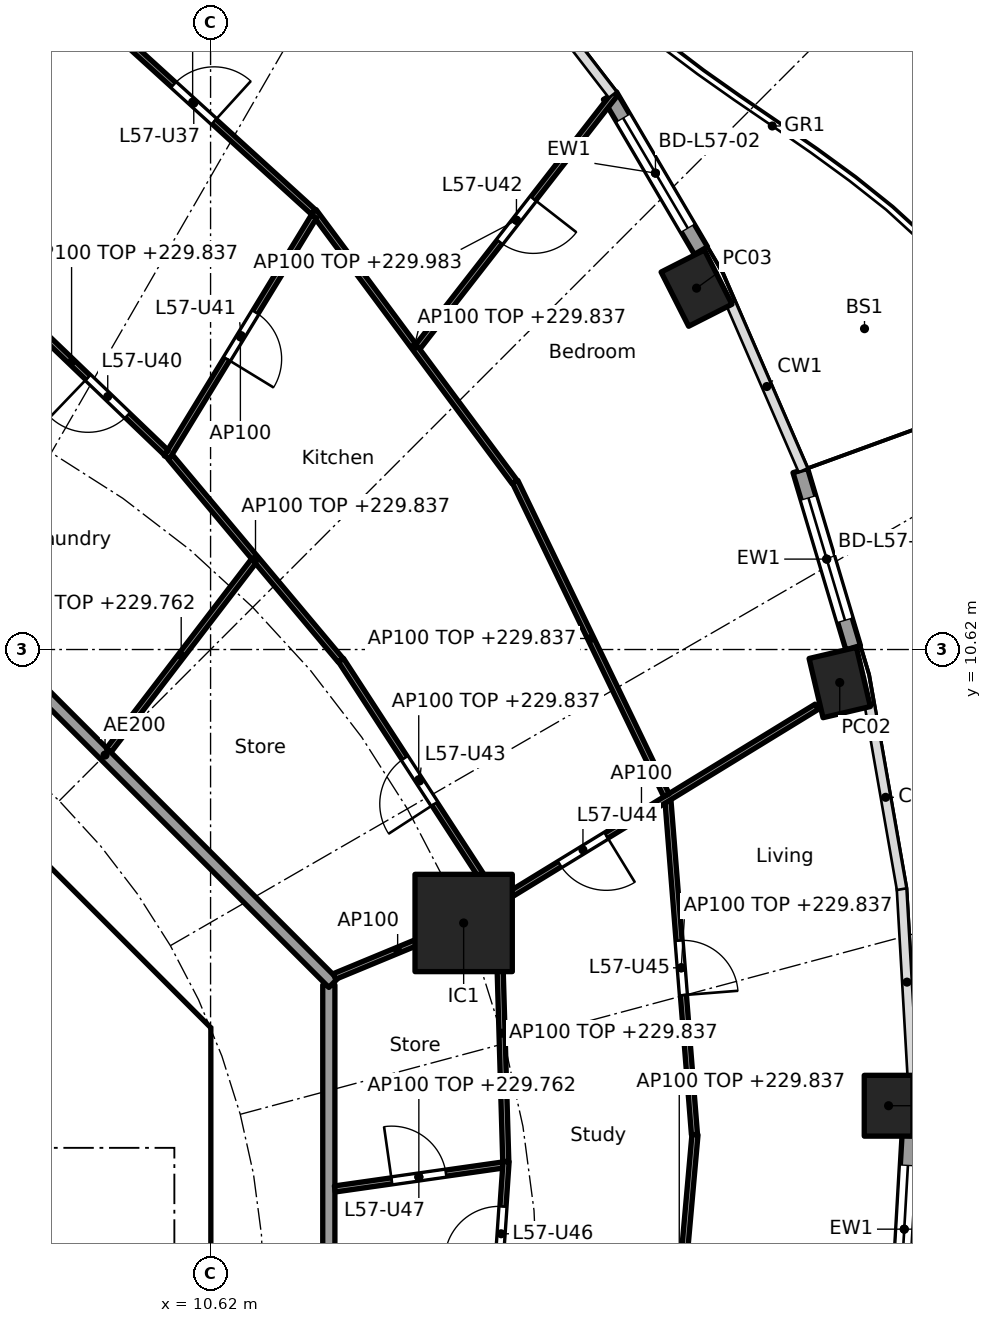
"""IFC4 building model, lengths in metres.
Left out: names, types, materials, properties, quantities, classifications, styles, units other than length and angle.
Written with IfcOpenShell. Run it as: python <this file> out.ifc"""

import sys

from ifc_helpers import new_model, si_unit, direction, frame, frame_2d, origin, origin_2d, place, context, subcontext, project, spatial, polyline, rectangle, hollow_rectangle, outline, extrude, element, fill, save


model = new_model("IFC4")
c1 = context("Model", 3, precision=1e-05, world=origin(), true_north=direction((0.0, 1.0)))
c2 = subcontext(c1, "Body", "Model", "MODEL_VIEW")
j1 = project(units=[si_unit("LENGTHUNIT", "METRE"), si_unit("PLANEANGLEUNIT", "RADIAN")], contexts=[c1])
p1 = place(None, origin())
s1 = spatial("IfcSite", under=j1, at=p1, CompositionType="ELEMENT")
p2 = place(p1, origin())
s2 = spatial("IfcBuilding", under=s1, at=p2, CompositionType="ELEMENT")
p3 = place(p2, frame((0.0, 0.0, 227.0)))
s3 = spatial("IfcBuildingStorey", under=s2, at=p3, CompositionType="ELEMENT", Elevation=227.0)
for number, where, z_axis, x_axis in (
    (1, (21.77, 3.118, 0.0), (0.0, 0.0, 1.0), (0.0, 1.0, 0.0)),
    (2, (20.967, 10.077, 0.0), (0.0, 0.0, 1.0), (-0.229, 0.973, 0.0)),
    (3, (18.612, 16.563, 0.0), (0.0, 0.0, 1.0), (-0.452, 0.892, 0.0)),
):
    element("IfcColumn", number, at=place(p3, frame(where, z_axis=z_axis, x_axis=x_axis)), inside=s3, PredefinedType="COLUMN", context=c2, shape_type="SweptSolid", body=[
        extrude(hollow_rectangle(XDim=1.0, YDim=0.8, WallThickness=0.032, at=origin_2d()), origin(), (0.0, 0.0, 1.0), 3.7),
    ])
p4 = place(p3, frame((14.782, 6.123, 0.0), z_axis=(0.0, 0.0, 1.0), x_axis=(1.0, 0.0, 0.0)))
e4 = element("IfcColumn", 4, at=p4, inside=s3, PredefinedType="COLUMN", context=c2, shape_type="SweptSolid", body=[
    extrude(rectangle(XDim=1.6, YDim=1.6, at=origin_2d()), origin(), (0.0, 0.0, 1.0), 3.7),
])
p5 = place(p3, frame((20.318, 13.564, 0.0), z_axis=(0.0, 0.0, 1.0), x_axis=(0.285785716255, -0.958293548128, 0.0)))
e5 = element("IfcWall", 5, at=p5, inside=s3, PredefinedType="SOLIDWALL", context=c2, shape_type="SweptSolid", body=[
    extrude(rectangle(XDim=3.04, YDim=0.25, at=frame_2d((1.52, 0.0))), origin(), (0.0, 0.0, 1.0), 3.44),
])
p6 = place(p5, frame((0.47, 0.0, 0.0)))
e6 = element("IfcOpeningElement", 6, at=p6, cuts=e5, PredefinedType="OPENING", context=c2, shape_type="SweptSolid", body=[
    extrude(rectangle(XDim=2.1, YDim=2.4, at=frame_2d((1.05, 1.2))), frame((0.0, 0.135, 0.0), z_axis=(0.0, -1.0, 0.0), x_axis=(1.0, 0.0, 0.0)), (0.0, 0.0, 1.0), 0.27),
])
p7 = place(p3, frame((17.188, 19.728, 0.0), z_axis=(0.0, 0.0, 1.0), x_axis=(0.506391620556, -0.862303616269, 0.0)))
e7 = element("IfcWall", 7, at=p7, inside=s3, PredefinedType="SOLIDWALL", context=c2, shape_type="SweptSolid", body=[
    extrude(rectangle(XDim=2.954, YDim=0.25, at=frame_2d((1.477, 0.0))), origin(), (0.0, 0.0, 1.0), 3.44),
])
p8 = place(p7, frame((0.427, 0.0, 0.0)))
e8 = element("IfcOpeningElement", 8, at=p8, cuts=e7, PredefinedType="OPENING", context=c2, shape_type="SweptSolid", body=[
    extrude(rectangle(XDim=2.1, YDim=2.4, at=frame_2d((1.05, 1.2))), frame((0.0, 0.135, 0.0), z_axis=(0.0, -1.0, 0.0), x_axis=(1.0, 0.0, 0.0)), (0.0, 0.0, 1.0), 0.27),
])
p9 = place(p3, frame((22.116, 2.626, 0.0), z_axis=(0.0, 0.0, 1.0), x_axis=(-0.057528189427, -0.998343882348, 0.0)))
e9 = element("IfcWall", 9, at=p9, inside=s3, PredefinedType="SOLIDWALL", context=c2, shape_type="SweptSolid", body=[
    extrude(rectangle(XDim=3.081, YDim=0.25, at=frame_2d((1.541, 0.0))), origin(), (0.0, 0.0, 1.0), 3.44),
])
p10 = place(p9, frame((0.49, 0.0, 0.0)))
e10 = element("IfcOpeningElement", 10, at=p10, cuts=e9, PredefinedType="OPENING", context=c2, shape_type="SweptSolid", body=[
    extrude(rectangle(XDim=2.1, YDim=2.4, at=frame_2d((1.05, 1.2))), frame((0.0, 0.135, 0.0), z_axis=(0.0, -1.0, 0.0), x_axis=(1.0, 0.0, 0.0)), (0.0, 0.0, 1.0), 0.27),
])
p11 = place(p3, frame((9.988, 4.613, 0.0), z_axis=(0.0, 0.0, 1.0), x_axis=(-0.707106781187, 0.707106781187, 0.0)))
e11 = element("IfcWall", 11, at=p11, inside=s3, PredefinedType="SHEAR", context=c2, shape_type="SweptSolid", body=[
    extrude(rectangle(XDim=7.602, YDim=0.6, at=frame_2d((3.801, 0.0))), origin(), (0.0, 0.0, 1.0), 3.44),
])
p12 = place(p11, frame((3.201, 0.0, 0.0)))
e12 = element("IfcOpeningElement", 12, at=p12, cuts=e11, PredefinedType="OPENING", context=c2, shape_type="SweptSolid", body=[
    extrude(rectangle(XDim=1.2, YDim=2.1, at=frame_2d((0.6, 1.05))), frame((0.0, 0.31, 0.0), z_axis=(0.0, -1.0, 0.0), x_axis=(1.0, 0.0, 0.0)), (0.0, 0.0, 1.0), 0.62),
])
p13 = place(p3, frame((6.7, 4.0, 0.0), z_axis=(0.0, 0.0, 1.0), x_axis=(1.0, 0.0, 0.0)))
e13 = element("IfcWall", 13, at=p13, inside=s3, PredefinedType="SOLIDWALL", context=c2, shape_type="SweptSolid", body=[
    extrude(rectangle(XDim=3.325, YDim=0.2, at=frame_2d((1.662, 0.0))), origin(), (0.0, 0.0, 1.0), 3.44),
])
p14 = place(p13, frame((1.25, 0.0, 0.0)))
e14 = element("IfcOpeningElement", 14, at=p14, cuts=e13, PredefinedType="OPENING", context=c2, shape_type="SweptSolid", body=[
    extrude(rectangle(XDim=1.1, YDim=2.1, at=frame_2d((0.55, 1.05))), frame((0.0, 0.11, 0.0), z_axis=(0.0, -1.0, 0.0), x_axis=(1.0, 0.0, 0.0)), (0.0, 0.0, 1.0), 0.22),
])
p15 = place(p3, origin())
e15 = element("IfcWall", 15, at=p15, inside=s3, PredefinedType="SHEAR", context=c2, shape_type="SweptSolid", body=[
    extrude(outline(polyline([(9.776, -4.401), (10.025, -4.152), (10.025, -3.801), (10.025, 4.152), (9.776, 4.401), (10.2, 4.825), (10.625, 4.401), (10.625, -4.401), (10.2, -4.825), (9.776, -4.401)])), origin(), (0.0, 0.0, 1.0), 3.44),
])
p16 = place(p3, frame((12.565, -5.104, 0.0), z_axis=(0.0, 0.0, 1.0), x_axis=(0.0, 1.0, 0.0)))
e16 = element("IfcWall", 16, at=p16, inside=s3, PredefinedType="PARTITIONING", context=c2, shape_type="SweptSolid", body=[
    extrude(rectangle(XDim=10.209, YDim=0.2, at=frame_2d((5.104, 0.0))), origin(), (0.0, 0.0, 1.0), 3.44),
])
p17 = place(p3, frame((12.635, 5.134, 0.0), z_axis=(0.0, 0.0, 1.0), x_axis=(-0.707106781187, 0.707106781187, 0.0)))
e17 = element("IfcWall", 17, at=p17, inside=s3, PredefinedType="PARTITIONING", context=c2, shape_type="SweptSolid", body=[
    extrude(rectangle(XDim=10.609, YDim=0.2, at=frame_2d((5.305, 0.0))), origin(), (0.0, 0.0, 1.0), 3.44),
])
p18 = place(p3, frame((12.664, 1.749, 0.0), z_axis=(0.0, 0.0, 1.0), x_axis=(0.990007147727, 0.14101718849, 0.0)))
e18 = element("IfcWall", 18, at=p18, inside=s3, PredefinedType="PARTITIONING", context=c2, shape_type="SweptSolid", body=[
    extrude(rectangle(XDim=2.791, YDim=0.1, at=frame_2d((1.396, 0.0))), origin(), (0.0, 0.0, 1.0), 2.762),
])
p19 = place(p18, frame((0.946, 0.0, 0.0)))
e19 = element("IfcOpeningElement", 19, at=p19, cuts=e18, PredefinedType="OPENING", context=c2, shape_type="SweptSolid", body=[
    extrude(rectangle(XDim=0.9, YDim=2.1, at=frame_2d((0.45, 1.05))), frame((0.0, 0.06, 0.0), z_axis=(0.0, -1.0, 0.0), x_axis=(1.0, 0.0, 0.0)), (0.0, 0.0, 1.0), 0.12),
])
p20 = place(p3, frame((15.475, 2.2, 0.0), z_axis=(0.0, 0.0, 1.0), x_axis=(-0.029254637498, 0.999571991497, 0.0)))
e20 = element("IfcWall", 20, at=p20, inside=s3, PredefinedType="PARTITIONING", context=c2, shape_type="SweptSolid", body=[
    extrude(rectangle(XDim=4.223, YDim=0.1, at=frame_2d((2.111, 0.0))), origin(), (0.0, 0.0, 1.0), 2.837),
])
p21 = place(p3, frame((15.48, 2.199, 0.0), z_axis=(0.0, 0.0, 1.0), x_axis=(-0.068558685949, -0.997647085186, 0.0)))
e21 = element("IfcWall", 21, at=p21, inside=s3, PredefinedType="PARTITIONING", context=c2, shape_type="SweptSolid", body=[
    extrude(rectangle(XDim=8.365, YDim=0.1, at=frame_2d((4.183, 0.0))), origin(), (0.0, 0.0, 1.0), 2.837),
])
p22 = place(p21, frame((0.74, 0.0, 0.0)))
e22 = element("IfcOpeningElement", 22, at=p22, cuts=e21, PredefinedType="OPENING", context=c2, shape_type="SweptSolid", body=[
    extrude(rectangle(XDim=0.9, YDim=2.1, at=frame_2d((0.45, 1.05))), frame((0.0, 0.06, 0.0), z_axis=(0.0, -1.0, 0.0), x_axis=(1.0, 0.0, 0.0)), (0.0, 0.0, 1.0), 0.12),
])
p23 = place(p3, frame((18.578, 2.642, 0.0), z_axis=(0.0, 0.0, 1.0), x_axis=(-0.079179272956, 0.9968603928, 0.0)))
e23 = element("IfcWall", 23, at=p23, inside=s3, PredefinedType="PARTITIONING", context=c2, shape_type="SweptSolid", body=[
    extrude(rectangle(XDim=5.504, YDim=0.1, at=frame_2d((2.752, 0.0))), origin(), (0.0, 0.0, 1.0), 2.837),
])
p24 = place(p23, frame((2.302, 0.0, 0.0)))
e24 = element("IfcOpeningElement", 24, at=p24, cuts=e23, PredefinedType="OPENING", context=c2, shape_type="SweptSolid", body=[
    extrude(rectangle(XDim=0.9, YDim=2.1, at=frame_2d((0.45, 1.05))), frame((0.0, 0.06, 0.0), z_axis=(0.0, -1.0, 0.0), x_axis=(1.0, 0.0, 0.0)), (0.0, 0.0, 1.0), 0.12),
])
p25 = place(p3, frame((18.586, 2.642, 0.0), z_axis=(0.0, 0.0, 1.0), x_axis=(-0.088638473361, -0.996063863937, 0.0)))
e25 = element("IfcWall", 25, at=p25, inside=s3, PredefinedType="PARTITIONING", context=c2, shape_type="SweptSolid", body=[
    extrude(rectangle(XDim=5.836, YDim=0.1, at=frame_2d((2.918, 0.0))), origin(), (0.0, 0.0, 1.0), 2.837),
])
p26 = place(p3, frame((12.657, 5.243, 0.0), z_axis=(0.0, 0.0, 1.0), x_axis=(0.923864733477, 0.382719158442, 0.0)))
e26 = element("IfcWall", 26, at=p26, inside=s3, PredefinedType="PARTITIONING", context=c2, shape_type="SweptSolid", body=[
    extrude(rectangle(XDim=2.25, YDim=0.1, at=frame_2d((1.125, 0.0))), origin(), (0.0, 0.0, 1.0), 3.44),
])
p27 = place(p3, frame((14.825, 6.149, 0.0), z_axis=(0.0, 0.0, 1.0), x_axis=(0.852781365284, 0.522268075824, 0.0)))
e27 = element("IfcWall", 27, at=p27, inside=s3, PredefinedType="PARTITIONING", context=c2, shape_type="SweptSolid", body=[
    extrude(rectangle(XDim=6.758, YDim=0.1, at=frame_2d((3.379, 0.0))), origin(), (0.0, 0.0, 1.0), 3.44),
])
p28 = place(p27, frame((1.801, 0.0, 0.0)))
e28 = element("IfcOpeningElement", 28, at=p28, cuts=e27, PredefinedType="OPENING", context=c2, shape_type="SweptSolid", body=[
    extrude(rectangle(XDim=0.9, YDim=2.1, at=frame_2d((0.45, 1.05))), frame((0.0, 0.06, 0.0), z_axis=(0.0, -1.0, 0.0), x_axis=(1.0, 0.0, 0.0)), (0.0, 0.0, 1.0), 0.12),
])
p29 = place(p3, frame((15.323, 6.512, 0.0), z_axis=(0.0, 0.0, 1.0), x_axis=(-0.545191322361, 0.8383116497, 0.0)))
e29 = element("IfcWall", 29, at=p29, inside=s3, PredefinedType="PARTITIONING", context=c2, shape_type="SweptSolid", body=[
    extrude(rectangle(XDim=4.693, YDim=0.1, at=frame_2d((2.346, 0.0))), origin(), (0.0, 0.0, 1.0), 2.837),
])
p30 = place(p29, frame((1.871, 0.0, 0.0)))
e30 = element("IfcOpeningElement", 30, at=p30, cuts=e29, PredefinedType="OPENING", context=c2, shape_type="SweptSolid", body=[
    extrude(rectangle(XDim=0.9, YDim=2.1, at=frame_2d((0.45, 1.05))), frame((0.0, 0.06, 0.0), z_axis=(0.0, -1.0, 0.0), x_axis=(1.0, 0.0, 0.0)), (0.0, 0.0, 1.0), 0.12),
])
p31 = place(p3, frame((18.117, 8.224, 0.0), z_axis=(0.0, 0.0, 1.0), x_axis=(-0.434647681571, 0.900600573453, 0.0)))
e31 = element("IfcWall", 31, at=p31, inside=s3, PredefinedType="PARTITIONING", context=c2, shape_type="SweptSolid", body=[
    extrude(rectangle(XDim=5.724, YDim=0.1, at=frame_2d((2.862, 0.0))), origin(), (0.0, 0.0, 1.0), 2.837),
])
p32 = place(p3, frame((12.759, 10.443, 0.0), z_axis=(0.0, 0.0, 1.0), x_axis=(-0.642225196965, 0.766516011825, 0.0)))
e32 = element("IfcWall", 32, at=p32, inside=s3, PredefinedType="PARTITIONING", context=c2, shape_type="SweptSolid", body=[
    extrude(rectangle(XDim=4.361, YDim=0.1, at=frame_2d((2.18, 0.0))), origin(), (0.0, 0.0, 1.0), 2.837),
])
p33 = place(p3, frame((15.621, 13.374, 0.0), z_axis=(0.0, 0.0, 1.0), x_axis=(-0.596165830899, 0.802861321816, 0.0)))
e33 = element("IfcWall", 33, at=p33, inside=s3, PredefinedType="PARTITIONING", context=c2, shape_type="SweptSolid", body=[
    extrude(rectangle(XDim=5.542, YDim=0.1, at=frame_2d((2.771, 0.0))), origin(), (0.0, 0.0, 1.0), 2.837),
])
p34 = place(p3, frame((8.946, 8.964, 0.0), z_axis=(0.0, 0.0, 1.0), x_axis=(0.608213063121, 0.793773815296, 0.0)))
e34 = element("IfcWall", 34, at=p34, inside=s3, PredefinedType="PARTITIONING", context=c2, shape_type="SweptSolid", body=[
    extrude(rectangle(XDim=3.918, YDim=0.1, at=frame_2d((1.959, 0.0))), origin(), (0.0, 0.0, 1.0), 2.762),
])
p35 = place(p3, frame((14.029, 15.598, 0.0), z_axis=(0.0, 0.0, 1.0), x_axis=(0.614558710688, 0.788871086501, 0.0)))
e35 = element("IfcWall", 35, at=p35, inside=s3, PredefinedType="PARTITIONING", context=c2, shape_type="SweptSolid", body=[
    extrude(rectangle(XDim=5.276, YDim=0.1, at=frame_2d((2.638, 0.0))), origin(), (0.0, 0.0, 1.0), 2.983),
])
p36 = place(p35, frame((2.188, 0.0, 0.0)))
e36 = element("IfcOpeningElement", 36, at=p36, cuts=e35, PredefinedType="OPENING", context=c2, shape_type="SweptSolid", body=[
    extrude(rectangle(XDim=0.9, YDim=2.1, at=frame_2d((0.45, 1.05))), frame((0.0, 0.06, 0.0), z_axis=(0.0, -1.0, 0.0), x_axis=(1.0, 0.0, 0.0)), (0.0, 0.0, 1.0), 0.12),
])
p37 = place(p3, frame((9.9, 13.781, 0.0), z_axis=(0.0, 0.0, 1.0), x_axis=(0.521464905534, 0.853272730313, 0.0)))
e37 = element("IfcWall", 37, at=p37, inside=s3, PredefinedType="PARTITIONING", context=c2, shape_type="SweptSolid", body=[
    extrude(rectangle(XDim=4.641, YDim=0.1, at=frame_2d((2.32, 0.0))), origin(), (0.0, 0.0, 1.0), 3.44),
])
p38 = place(p37, frame((1.895, 0.0, 0.0)))
e38 = element("IfcOpeningElement", 38, at=p38, cuts=e37, PredefinedType="OPENING", context=c2, shape_type="SweptSolid", body=[
    extrude(rectangle(XDim=0.9, YDim=2.1, at=frame_2d((0.45, 1.05))), frame((0.0, 0.06, 0.0), z_axis=(0.0, -1.0, 0.0), x_axis=(1.0, 0.0, 0.0)), (0.0, 0.0, 1.0), 0.12),
])
p39 = place(p3, frame((9.89, 13.858, 0.0), z_axis=(0.0, 0.0, 1.0), x_axis=(-0.72167233993, 0.692234811159, 0.0)))
e39 = element("IfcWall", 39, at=p39, inside=s3, PredefinedType="PARTITIONING", context=c2, shape_type="SweptSolid", body=[
    extrude(rectangle(XDim=4.313, YDim=0.1, at=frame_2d((2.156, 0.0))), origin(), (0.0, 0.0, 1.0), 2.837),
])
p40 = place(p39, frame((0.883, 0.0, 0.0)))
e40 = element("IfcOpeningElement", 40, at=p40, cuts=e39, PredefinedType="OPENING", context=c2, shape_type="SweptSolid", body=[
    extrude(rectangle(XDim=0.9, YDim=2.1, at=frame_2d((0.45, 1.05))), frame((0.0, 0.06, 0.0), z_axis=(0.0, -1.0, 0.0), x_axis=(1.0, 0.0, 0.0)), (0.0, 0.0, 1.0), 0.12),
])
p41 = place(p3, frame((12.31, 17.817, 0.0), z_axis=(0.0, 0.0, 1.0), x_axis=(-0.739697052892, 0.672940019573, 0.0)))
e41 = element("IfcWall", 41, at=p41, inside=s3, PredefinedType="PARTITIONING", context=c2, shape_type="SweptSolid", body=[
    extrude(rectangle(XDim=5.365, YDim=0.1, at=frame_2d((2.683, 0.0))), origin(), (0.0, 0.0, 1.0), 2.837),
])
p42 = place(p41, frame((2.208, 0.0, 0.0)))
e42 = element("IfcOpeningElement", 42, at=p42, cuts=e41, PredefinedType="OPENING", context=c2, shape_type="SweptSolid", body=[
    extrude(rectangle(XDim=0.9, YDim=2.1, at=frame_2d((0.45, 1.05))), frame((0.0, 0.06, 0.0), z_axis=(0.0, -1.0, 0.0), x_axis=(1.0, 0.0, 0.0)), (0.0, 0.0, 1.0), 0.12),
])
p43 = place(p6, origin())
e43 = element("IfcDoor", 43, at=p43, inside=s3, OperationType="SLIDING_TO_LEFT", PredefinedType="DOOR", context=c2, shape_type="SweptSolid", body=[
    extrude(rectangle(XDim=2.1, YDim=2.4, at=frame_2d((1.05, 1.2))), frame((0.0, 0.025, 0.0), z_axis=(0.0, -1.0, 0.0), x_axis=(1.0, 0.0, 0.0)), (0.0, 0.0, 1.0), 0.05),
])
fill(e6, e43)
p44 = place(p8, origin())
e44 = element("IfcDoor", 44, at=p44, inside=s3, OperationType="SLIDING_TO_LEFT", PredefinedType="DOOR", context=c2, shape_type="SweptSolid", body=[
    extrude(rectangle(XDim=2.1, YDim=2.4, at=frame_2d((1.05, 1.2))), frame((0.0, 0.025, 0.0), z_axis=(0.0, -1.0, 0.0), x_axis=(1.0, 0.0, 0.0)), (0.0, 0.0, 1.0), 0.05),
])
fill(e8, e44)
p45 = place(p10, origin())
e45 = element("IfcDoor", 45, at=p45, inside=s3, OperationType="SLIDING_TO_LEFT", PredefinedType="DOOR", context=c2, shape_type="SweptSolid", body=[
    extrude(rectangle(XDim=2.1, YDim=2.4, at=frame_2d((1.05, 1.2))), frame((0.0, 0.025, 0.0), z_axis=(0.0, -1.0, 0.0), x_axis=(1.0, 0.0, 0.0)), (0.0, 0.0, 1.0), 0.05),
])
fill(e10, e45)
p46 = place(p14, frame((1.1, 0.0, 0.0), x_axis=(-1.0, 0.0, 0.0)))
e46 = element("IfcDoor", 46, at=p46, inside=s3, OperationType="SINGLE_SWING_LEFT", PredefinedType="DOOR", context=c2, shape_type="SweptSolid", body=[
    extrude(rectangle(XDim=1.1, YDim=2.1, at=frame_2d((0.55, 1.05))), frame((0.0, 0.025, 0.0), z_axis=(0.0, -1.0, 0.0), x_axis=(1.0, 0.0, 0.0)), (0.0, 0.0, 1.0), 0.05),
])
fill(e14, e46)
p47 = place(p42, frame((0.9, 0.0, 0.0), x_axis=(-1.0, 0.0, 0.0)))
e47 = element("IfcDoor", 47, at=p47, inside=s3, OperationType="SINGLE_SWING_RIGHT", PredefinedType="DOOR", context=c2, shape_type="SweptSolid", body=[
    extrude(rectangle(XDim=0.9, YDim=2.1, at=frame_2d((0.45, 1.05))), frame((0.0, 0.025, 0.0), z_axis=(0.0, -1.0, 0.0), x_axis=(1.0, 0.0, 0.0)), (0.0, 0.0, 1.0), 0.05),
])
fill(e42, e47)
p48 = place(p40, origin())
e48 = element("IfcDoor", 48, at=p48, inside=s3, OperationType="SINGLE_SWING_RIGHT", PredefinedType="DOOR", context=c2, shape_type="SweptSolid", body=[
    extrude(rectangle(XDim=0.9, YDim=2.1, at=frame_2d((0.45, 1.05))), frame((0.0, 0.025, 0.0), z_axis=(0.0, -1.0, 0.0), x_axis=(1.0, 0.0, 0.0)), (0.0, 0.0, 1.0), 0.05),
])
fill(e40, e48)
p49 = place(p38, frame((0.9, 0.0, 0.0), x_axis=(-1.0, 0.0, 0.0)))
e49 = element("IfcDoor", 49, at=p49, inside=s3, OperationType="SINGLE_SWING_RIGHT", PredefinedType="DOOR", context=c2, shape_type="SweptSolid", body=[
    extrude(rectangle(XDim=0.9, YDim=2.1, at=frame_2d((0.45, 1.05))), frame((0.0, 0.025, 0.0), z_axis=(0.0, -1.0, 0.0), x_axis=(1.0, 0.0, 0.0)), (0.0, 0.0, 1.0), 0.05),
])
fill(e38, e49)
p50 = place(p36, frame((0.9, 0.0, 0.0), x_axis=(-1.0, 0.0, 0.0)))
e50 = element("IfcDoor", 50, at=p50, inside=s3, OperationType="SINGLE_SWING_LEFT", PredefinedType="DOOR", context=c2, shape_type="SweptSolid", body=[
    extrude(rectangle(XDim=0.9, YDim=2.1, at=frame_2d((0.45, 1.05))), frame((0.0, 0.025, 0.0), z_axis=(0.0, -1.0, 0.0), x_axis=(1.0, 0.0, 0.0)), (0.0, 0.0, 1.0), 0.05),
])
fill(e36, e50)
p51 = place(p30, origin())
e51 = element("IfcDoor", 51, at=p51, inside=s3, OperationType="SINGLE_SWING_LEFT", PredefinedType="DOOR", context=c2, shape_type="SweptSolid", body=[
    extrude(rectangle(XDim=0.9, YDim=2.1, at=frame_2d((0.45, 1.05))), frame((0.0, 0.025, 0.0), z_axis=(0.0, -1.0, 0.0), x_axis=(1.0, 0.0, 0.0)), (0.0, 0.0, 1.0), 0.05),
])
fill(e30, e51)
p52 = place(p28, frame((0.9, 0.0, 0.0), x_axis=(-1.0, 0.0, 0.0)))
e52 = element("IfcDoor", 52, at=p52, inside=s3, OperationType="SINGLE_SWING_LEFT", PredefinedType="DOOR", context=c2, shape_type="SweptSolid", body=[
    extrude(rectangle(XDim=0.9, YDim=2.1, at=frame_2d((0.45, 1.05))), frame((0.0, 0.025, 0.0), z_axis=(0.0, -1.0, 0.0), x_axis=(1.0, 0.0, 0.0)), (0.0, 0.0, 1.0), 0.05),
])
fill(e28, e52)
p53 = place(p24, frame((0.9, 0.0, 0.0), x_axis=(-1.0, 0.0, 0.0)))
e53 = element("IfcDoor", 53, at=p53, inside=s3, OperationType="SINGLE_SWING_RIGHT", PredefinedType="DOOR", context=c2, shape_type="SweptSolid", body=[
    extrude(rectangle(XDim=0.9, YDim=2.1, at=frame_2d((0.45, 1.05))), frame((0.0, 0.025, 0.0), z_axis=(0.0, -1.0, 0.0), x_axis=(1.0, 0.0, 0.0)), (0.0, 0.0, 1.0), 0.05),
])
fill(e24, e53)
p54 = place(p22, frame((0.9, 0.0, 0.0), x_axis=(-1.0, 0.0, 0.0)))
e54 = element("IfcDoor", 54, at=p54, inside=s3, OperationType="SINGLE_SWING_LEFT", PredefinedType="DOOR", context=c2, shape_type="SweptSolid", body=[
    extrude(rectangle(XDim=0.9, YDim=2.1, at=frame_2d((0.45, 1.05))), frame((0.0, 0.025, 0.0), z_axis=(0.0, -1.0, 0.0), x_axis=(1.0, 0.0, 0.0)), (0.0, 0.0, 1.0), 0.05),
])
fill(e22, e54)
p55 = place(p19, origin())
e55 = element("IfcDoor", 55, at=p55, inside=s3, OperationType="SINGLE_SWING_LEFT", PredefinedType="DOOR", context=c2, shape_type="SweptSolid", body=[
    extrude(rectangle(XDim=0.9, YDim=2.1, at=frame_2d((0.45, 1.05))), frame((0.0, 0.025, 0.0), z_axis=(0.0, -1.0, 0.0), x_axis=(1.0, 0.0, 0.0)), (0.0, 0.0, 1.0), 0.05),
])
fill(e19, e55)
save(model, sys.argv[1])
